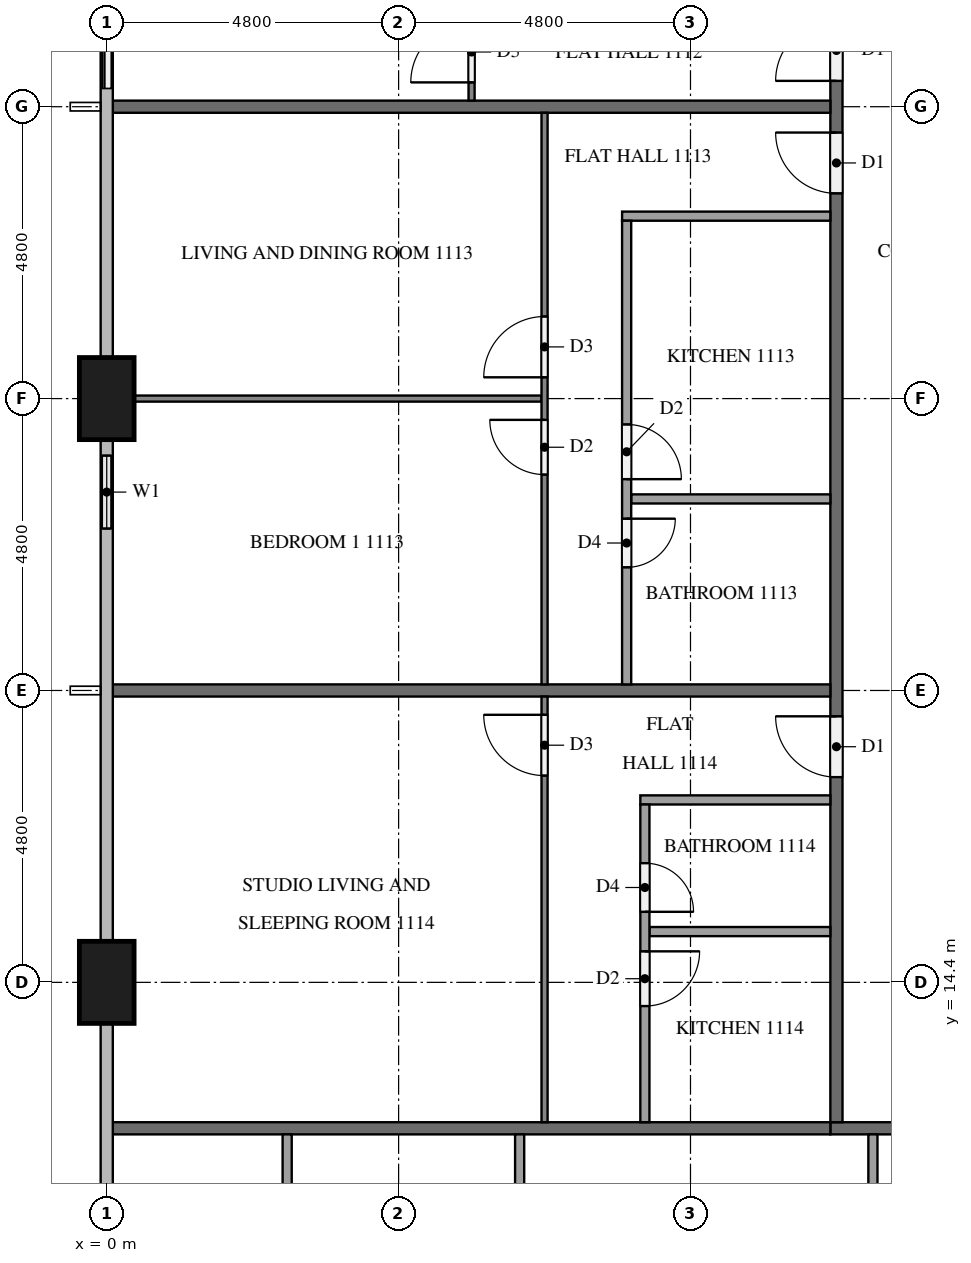
"""IFC4 building model, lengths in metres.
Left out: names, types, materials, properties, quantities, classifications, styles, units other than length and angle.
Written with IfcOpenShell. Run it as: python <this file> out.ifc"""

import sys

from ifc_helpers import new_model, si_unit, direction, frame, frame_2d, origin, origin_2d, place, context, subcontext, project, spatial, rectangle, extrude, element, fill, save


model = new_model("IFC4")
c1 = context("Model", 3, precision=1e-05, world=origin(), true_north=direction((0.0, 1.0)))
c2 = subcontext(c1, "Body", "Model", "MODEL_VIEW")
j1 = project(units=[si_unit("LENGTHUNIT", "METRE"), si_unit("PLANEANGLEUNIT", "RADIAN")], contexts=[c1])
p1 = place(None, origin())
s1 = spatial("IfcSite", under=j1, at=p1, CompositionType="ELEMENT")
p2 = place(p1, origin())
s2 = spatial("IfcBuilding", under=s1, at=p2, CompositionType="ELEMENT")
p3 = place(p2, frame((0.0, 0.0, 46.9)))
s3 = spatial("IfcBuildingStorey", under=s2, at=p3, CompositionType="ELEMENT", Elevation=46.9)
for number, where, z_axis, x_axis in (
    (1, (0.0, 24.0, 0.0), (0.0, 0.0, 1.0), (0.0, 1.0, 0.0)),
    (2, (0.0, 14.4, 0.0), (0.0, 0.0, 1.0), (0.0, 1.0, 0.0)),
):
    element("IfcColumn", number, at=place(p3, frame(where, z_axis=z_axis, x_axis=x_axis)), inside=s3, PredefinedType="COLUMN", context=c2, shape_type="SweptSolid", body=[
        extrude(rectangle(XDim=1.35, YDim=0.9, at=origin_2d()), origin(), (0.0, 0.0, 1.0), 3.2),
    ])
p4 = place(p3, frame((0.0, 31.2, 0.0), z_axis=(0.0, 0.0, 1.0), x_axis=(0.0, -1.0, 0.0)))
e3 = element("IfcWall", 3, at=p4, inside=s3, PredefinedType="SOLIDWALL", context=c2, shape_type="SweptSolid", body=[
    extrude(rectangle(XDim=2.4, YDim=0.15, at=frame_2d((1.2, 0.0))), origin(), (0.0, 0.0, 1.0), 3.2),
])
p5 = place(p4, frame((0.3, 0.0, 0.0)))
e4 = element("IfcOpeningElement", 4, at=p5, cuts=e3, PredefinedType="OPENING", context=c2, shape_type="SweptSolid", body=[
    extrude(rectangle(XDim=1.8, YDim=2.4, at=frame_2d((0.9, 1.2))), frame((0.0, 0.085, 0.0), z_axis=(0.0, -1.0, 0.0), x_axis=(1.0, 0.0, 0.0)), (0.0, 0.0, 1.0), 0.17),
])
p6 = place(p3, frame((0.0, 23.325, 0.0), z_axis=(0.0, 0.0, 1.0), x_axis=(0.0, -1.0, 0.0)))
e5 = element("IfcWall", 5, at=p6, inside=s3, PredefinedType="SOLIDWALL", context=c2, shape_type="SweptSolid", body=[
    extrude(rectangle(XDim=1.725, YDim=0.15, at=frame_2d((0.862, 0.0))), origin(), (0.0, 0.0, 1.0), 3.2),
])
p7 = place(p6, frame((0.262, 0.0, 0.9)))
e6 = element("IfcOpeningElement", 6, at=p7, cuts=e5, PredefinedType="OPENING", context=c2, shape_type="SweptSolid", body=[
    extrude(rectangle(XDim=1.2, YDim=1.4, at=frame_2d((0.6, 0.7))), frame((0.0, 0.085, 0.0), z_axis=(0.0, -1.0, 0.0), x_axis=(1.0, 0.0, 0.0)), (0.0, 0.0, 1.0), 0.17),
])
p8 = place(p3, frame((50.5, 12.0, 0.0), z_axis=(0.0, 0.0, 1.0), x_axis=(-1.0, 0.0, 0.0)))
e7 = element("IfcWall", 7, at=p8, inside=s3, PredefinedType="PARTITIONING", context=c2, shape_type="SweptSolid", body=[
    extrude(rectangle(XDim=38.6, YDim=0.2, at=frame_2d((19.3, 0.0))), origin(), (0.0, 0.0, 1.0), 3.2),
])
p9 = place(p8, frame((36.525, 0.0, 0.0)))
e8 = element("IfcOpeningElement", 8, at=p9, cuts=e7, PredefinedType="OPENING", context=c2, shape_type="SweptSolid", body=[
    extrude(rectangle(XDim=1.0, YDim=2.1, at=frame_2d((0.5, 1.05))), frame((0.0, 0.11, 0.0), z_axis=(0.0, -1.0, 0.0), x_axis=(1.0, 0.0, 0.0)), (0.0, 0.0, 1.0), 0.22),
])
p10 = place(p8, frame((24.525, 0.0, 0.0)))
e9 = element("IfcOpeningElement", 9, at=p10, cuts=e7, PredefinedType="OPENING", context=c2, shape_type="SweptSolid", body=[
    extrude(rectangle(XDim=1.0, YDim=2.1, at=frame_2d((0.5, 1.05))), frame((0.0, 0.11, 0.0), z_axis=(0.0, -1.0, 0.0), x_axis=(1.0, 0.0, 0.0)), (0.0, 0.0, 1.0), 0.22),
])
p11 = place(p8, frame((22.675, 0.0, 0.0)))
e10 = element("IfcOpeningElement", 10, at=p11, cuts=e7, PredefinedType="OPENING", context=c2, shape_type="SweptSolid", body=[
    extrude(rectangle(XDim=1.0, YDim=2.1, at=frame_2d((0.5, 1.05))), frame((0.0, 0.11, 0.0), z_axis=(0.0, -1.0, 0.0), x_axis=(1.0, 0.0, 0.0)), (0.0, 0.0, 1.0), 0.22),
])
p12 = place(p8, frame((8.275, 0.0, 0.0)))
e11 = element("IfcOpeningElement", 11, at=p12, cuts=e7, PredefinedType="OPENING", context=c2, shape_type="SweptSolid", body=[
    extrude(rectangle(XDim=1.0, YDim=2.1, at=frame_2d((0.5, 1.05))), frame((0.0, 0.11, 0.0), z_axis=(0.0, -1.0, 0.0), x_axis=(1.0, 0.0, 0.0)), (0.0, 0.0, 1.0), 0.22),
])
p13 = place(p3, frame((12.0, 12.1, 0.0), z_axis=(0.0, 0.0, 1.0), x_axis=(0.0, 1.0, 0.0)))
e12 = element("IfcWall", 12, at=p13, inside=s3, PredefinedType="PARTITIONING", context=c2, shape_type="SweptSolid", body=[
    extrude(rectangle(XDim=28.6, YDim=0.2, at=frame_2d((14.3, 0.0))), origin(), (0.0, 0.0, 1.0), 3.2),
])
p14 = place(p13, frame((26.725, 0.0, 0.0)))
e13 = element("IfcOpeningElement", 13, at=p14, cuts=e12, PredefinedType="OPENING", context=c2, shape_type="SweptSolid", body=[
    extrude(rectangle(XDim=1.0, YDim=2.1, at=frame_2d((0.5, 1.05))), frame((0.0, 0.11, 0.0), z_axis=(0.0, -1.0, 0.0), x_axis=(1.0, 0.0, 0.0)), (0.0, 0.0, 1.0), 0.22),
])
p15 = place(p13, frame((17.125, 0.0, 0.0)))
e14 = element("IfcOpeningElement", 14, at=p15, cuts=e12, PredefinedType="OPENING", context=c2, shape_type="SweptSolid", body=[
    extrude(rectangle(XDim=1.0, YDim=2.1, at=frame_2d((0.5, 1.05))), frame((0.0, 0.11, 0.0), z_axis=(0.0, -1.0, 0.0), x_axis=(1.0, 0.0, 0.0)), (0.0, 0.0, 1.0), 0.22),
])
p16 = place(p13, frame((15.275, 0.0, 0.0)))
e15 = element("IfcOpeningElement", 15, at=p16, cuts=e12, PredefinedType="OPENING", context=c2, shape_type="SweptSolid", body=[
    extrude(rectangle(XDim=1.0, YDim=2.1, at=frame_2d((0.5, 1.05))), frame((0.0, 0.11, 0.0), z_axis=(0.0, -1.0, 0.0), x_axis=(1.0, 0.0, 0.0)), (0.0, 0.0, 1.0), 0.22),
])
p17 = place(p13, frame((5.675, 0.0, 0.0)))
e16 = element("IfcOpeningElement", 16, at=p17, cuts=e12, PredefinedType="OPENING", context=c2, shape_type="SweptSolid", body=[
    extrude(rectangle(XDim=1.0, YDim=2.1, at=frame_2d((0.5, 1.05))), frame((0.0, 0.11, 0.0), z_axis=(0.0, -1.0, 0.0), x_axis=(1.0, 0.0, 0.0)), (0.0, 0.0, 1.0), 0.22),
])
for number, where, z_axis, x_axis in (
    (17, (0.1, 12.0, 0.0), (0.0, 0.0, 1.0), (1.0, 0.0, 0.0)),
    (18, (0.1, 28.8, 0.0), (0.0, 0.0, 1.0), (1.0, 0.0, 0.0)),
    (19, (0.1, 19.2, 0.0), (0.0, 0.0, 1.0), (1.0, 0.0, 0.0)),
):
    element("IfcWall", number, at=place(p3, frame(where, z_axis=z_axis, x_axis=x_axis)), inside=s3, PredefinedType="PARTITIONING", context=c2, shape_type="SweptSolid", body=[
        extrude(rectangle(XDim=11.8, YDim=0.2, at=frame_2d((5.9, 0.0))), origin(), (0.0, 0.0, 1.0), 3.2),
    ])
for number, where, z_axis, x_axis in (
    (20, (6.79, 11.9, 0.0), (0.0, 0.0, 1.0), (0.0, -1.0, 0.0)),
    (21, (2.967, 11.9, 0.0), (0.0, 0.0, 1.0), (0.0, -1.0, 0.0)),
):
    element("IfcWall", number, at=place(p3, frame(where, z_axis=z_axis, x_axis=x_axis)), inside=s3, PredefinedType="PARTITIONING", context=c2, shape_type="SweptSolid", body=[
        extrude(rectangle(XDim=3.725, YDim=0.15, at=frame_2d((1.862, 0.0))), origin(), (0.0, 0.0, 1.0), 3.2),
    ])
p18 = place(p3, frame((12.6, 11.9, 0.0), z_axis=(0.0, 0.0, 1.0), x_axis=(0.0, -1.0, 0.0)))
e22 = element("IfcWall", 22, at=p18, inside=s3, PredefinedType="PARTITIONING", context=c2, shape_type="SweptSolid", body=[
    extrude(rectangle(XDim=3.875, YDim=0.15, at=frame_2d((1.938, 0.0))), origin(), (0.0, 0.0, 1.0), 3.2),
])
p19 = place(p3, frame((6.0, 28.9, 0.0), z_axis=(0.0, 0.0, 1.0), x_axis=(0.0, 1.0, 0.0)))
e23 = element("IfcWall", 23, at=p19, inside=s3, PredefinedType="PARTITIONING", context=c2, shape_type="SweptSolid", body=[
    extrude(rectangle(XDim=9.4, YDim=0.1, at=frame_2d((4.7, 0.0))), origin(), (0.0, 0.0, 1.0), 3.2),
])
p20 = place(p19, frame((0.3, 0.0, 0.0)))
e24 = element("IfcOpeningElement", 24, at=p20, cuts=e23, PredefinedType="OPENING", context=c2, shape_type="SweptSolid", body=[
    extrude(rectangle(XDim=1.0, YDim=2.1, at=frame_2d((0.5, 1.05))), frame((0.0, 0.06, 0.0), z_axis=(0.0, -1.0, 0.0), x_axis=(1.0, 0.0, 0.0)), (0.0, 0.0, 1.0), 0.12),
])
p21 = place(p19, frame((8.2, 0.0, 0.0)))
e25 = element("IfcOpeningElement", 25, at=p21, cuts=e23, PredefinedType="OPENING", context=c2, shape_type="SweptSolid", body=[
    extrude(rectangle(XDim=0.9, YDim=2.1, at=frame_2d((0.45, 1.05))), frame((0.0, 0.06, 0.0), z_axis=(0.0, -1.0, 0.0), x_axis=(1.0, 0.0, 0.0)), (0.0, 0.0, 1.0), 0.12),
])
p22 = place(p3, frame((7.15, 24.0, 0.0), z_axis=(0.0, 0.0, 1.0), x_axis=(-1.0, 0.0, 0.0)))
e26 = element("IfcWall", 26, at=p22, inside=s3, PredefinedType="PARTITIONING", context=c2, shape_type="SweptSolid", body=[
    extrude(rectangle(XDim=6.7, YDim=0.1, at=frame_2d((3.35, 0.0))), origin(), (0.0, 0.0, 1.0), 3.2),
])
p23 = place(p3, frame((7.2, 19.3, 0.0), z_axis=(0.0, 0.0, 1.0), x_axis=(0.0, 1.0, 0.0)))
e27 = element("IfcWall", 27, at=p23, inside=s3, PredefinedType="PARTITIONING", context=c2, shape_type="SweptSolid", body=[
    extrude(rectangle(XDim=9.4, YDim=0.1, at=frame_2d((4.7, 0.0))), origin(), (0.0, 0.0, 1.0), 3.2),
])
p24 = place(p23, frame((5.05, 0.0, 0.0)))
e28 = element("IfcOpeningElement", 28, at=p24, cuts=e27, PredefinedType="OPENING", context=c2, shape_type="SweptSolid", body=[
    extrude(rectangle(XDim=1.0, YDim=2.1, at=frame_2d((0.5, 1.05))), frame((0.0, 0.06, 0.0), z_axis=(0.0, -1.0, 0.0), x_axis=(1.0, 0.0, 0.0)), (0.0, 0.0, 1.0), 0.12),
])
p25 = place(p23, frame((3.45, 0.0, 0.0)))
e29 = element("IfcOpeningElement", 29, at=p25, cuts=e27, PredefinedType="OPENING", context=c2, shape_type="SweptSolid", body=[
    extrude(rectangle(XDim=0.9, YDim=2.1, at=frame_2d((0.45, 1.05))), frame((0.0, 0.06, 0.0), z_axis=(0.0, -1.0, 0.0), x_axis=(1.0, 0.0, 0.0)), (0.0, 0.0, 1.0), 0.12),
])
p26 = place(p3, frame((11.9, 22.35, 0.0), z_axis=(0.0, 0.0, 1.0), x_axis=(-1.0, 0.0, 0.0)))
e30 = element("IfcWall", 30, at=p26, inside=s3, PredefinedType="PARTITIONING", context=c2, shape_type="SweptSolid", body=[
    extrude(rectangle(XDim=3.275, YDim=0.15, at=frame_2d((1.637, 0.0))), origin(), (0.0, 0.0, 1.0), 3.2),
])
p27 = place(p3, frame((11.9, 27.0, 0.0), z_axis=(0.0, 0.0, 1.0), x_axis=(-1.0, 0.0, 0.0)))
e31 = element("IfcWall", 31, at=p27, inside=s3, PredefinedType="PARTITIONING", context=c2, shape_type="SweptSolid", body=[
    extrude(rectangle(XDim=3.425, YDim=0.15, at=frame_2d((1.712, 0.0))), origin(), (0.0, 0.0, 1.0), 3.2),
])
p28 = place(p3, frame((8.55, 26.925, 0.0), z_axis=(0.0, 0.0, 1.0), x_axis=(0.0, -1.0, 0.0)))
e32 = element("IfcWall", 32, at=p28, inside=s3, PredefinedType="PARTITIONING", context=c2, shape_type="SweptSolid", body=[
    extrude(rectangle(XDim=7.625, YDim=0.15, at=frame_2d((3.812, 0.0))), origin(), (0.0, 0.0, 1.0), 3.2),
])
p29 = place(p28, frame((3.35, 0.0, 0.0)))
e33 = element("IfcOpeningElement", 33, at=p29, cuts=e32, PredefinedType="OPENING", context=c2, shape_type="SweptSolid", body=[
    extrude(rectangle(XDim=0.9, YDim=2.1, at=frame_2d((0.45, 1.05))), frame((0.0, 0.085, 0.0), z_axis=(0.0, -1.0, 0.0), x_axis=(1.0, 0.0, 0.0)), (0.0, 0.0, 1.0), 0.17),
])
p30 = place(p28, frame((4.9, 0.0, 0.0)))
e34 = element("IfcOpeningElement", 34, at=p30, cuts=e32, PredefinedType="OPENING", context=c2, shape_type="SweptSolid", body=[
    extrude(rectangle(XDim=0.8, YDim=2.1, at=frame_2d((0.4, 1.05))), frame((0.0, 0.085, 0.0), z_axis=(0.0, -1.0, 0.0), x_axis=(1.0, 0.0, 0.0)), (0.0, 0.0, 1.0), 0.17),
])
p31 = place(p3, frame((7.2, 12.1, 0.0), z_axis=(0.0, 0.0, 1.0), x_axis=(0.0, 1.0, 0.0)))
e35 = element("IfcWall", 35, at=p31, inside=s3, PredefinedType="PARTITIONING", context=c2, shape_type="SweptSolid", body=[
    extrude(rectangle(XDim=7.0, YDim=0.1, at=frame_2d((3.5, 0.0))), origin(), (0.0, 0.0, 1.0), 3.2),
])
p32 = place(p31, frame((5.7, 0.0, 0.0)))
e36 = element("IfcOpeningElement", 36, at=p32, cuts=e35, PredefinedType="OPENING", context=c2, shape_type="SweptSolid", body=[
    extrude(rectangle(XDim=1.0, YDim=2.1, at=frame_2d((0.5, 1.05))), frame((0.0, 0.06, 0.0), z_axis=(0.0, -1.0, 0.0), x_axis=(1.0, 0.0, 0.0)), (0.0, 0.0, 1.0), 0.12),
])
p33 = place(p3, frame((11.9, 15.235, 0.0), z_axis=(0.0, 0.0, 1.0), x_axis=(-1.0, 0.0, 0.0)))
e37 = element("IfcWall", 37, at=p33, inside=s3, PredefinedType="PARTITIONING", context=c2, shape_type="SweptSolid", body=[
    extrude(rectangle(XDim=2.975, YDim=0.15, at=frame_2d((1.487, 0.0))), origin(), (0.0, 0.0, 1.0), 3.2),
])
p34 = place(p3, frame((11.9, 17.4, 0.0), z_axis=(0.0, 0.0, 1.0), x_axis=(-1.0, 0.0, 0.0)))
e38 = element("IfcWall", 38, at=p34, inside=s3, PredefinedType="PARTITIONING", context=c2, shape_type="SweptSolid", body=[
    extrude(rectangle(XDim=3.125, YDim=0.15, at=frame_2d((1.562, 0.0))), origin(), (0.0, 0.0, 1.0), 3.2),
])
p35 = place(p3, frame((8.85, 17.325, 0.0), z_axis=(0.0, 0.0, 1.0), x_axis=(0.0, -1.0, 0.0)))
e39 = element("IfcWall", 39, at=p35, inside=s3, PredefinedType="PARTITIONING", context=c2, shape_type="SweptSolid", body=[
    extrude(rectangle(XDim=5.225, YDim=0.15, at=frame_2d((2.612, 0.0))), origin(), (0.0, 0.0, 1.0), 3.2),
])
p36 = place(p35, frame((0.965, 0.0, 0.0)))
e40 = element("IfcOpeningElement", 40, at=p36, cuts=e39, PredefinedType="OPENING", context=c2, shape_type="SweptSolid", body=[
    extrude(rectangle(XDim=0.8, YDim=2.1, at=frame_2d((0.4, 1.05))), frame((0.0, 0.085, 0.0), z_axis=(0.0, -1.0, 0.0), x_axis=(1.0, 0.0, 0.0)), (0.0, 0.0, 1.0), 0.17),
])
p37 = place(p35, frame((2.415, 0.0, 0.0)))
e41 = element("IfcOpeningElement", 41, at=p37, cuts=e39, PredefinedType="OPENING", context=c2, shape_type="SweptSolid", body=[
    extrude(rectangle(XDim=0.9, YDim=2.1, at=frame_2d((0.45, 1.05))), frame((0.0, 0.085, 0.0), z_axis=(0.0, -1.0, 0.0), x_axis=(1.0, 0.0, 0.0)), (0.0, 0.0, 1.0), 0.17),
])
p38 = place(p5, origin())
e42 = element("IfcDoor", 42, at=p38, inside=s3, OperationType="SLIDING_TO_RIGHT", PredefinedType="DOOR", context=c2, shape_type="SweptSolid", body=[
    extrude(rectangle(XDim=1.8, YDim=2.4, at=frame_2d((0.9, 1.2))), frame((0.0, 0.025, 0.0), z_axis=(0.0, -1.0, 0.0), x_axis=(1.0, 0.0, 0.0)), (0.0, 0.0, 1.0), 0.05),
])
fill(e4, e42)
p39 = place(p7, origin())
e43 = element("IfcWindow", 43, at=p39, inside=s3, PartitioningType="SINGLE_PANEL", PredefinedType="WINDOW", context=c2, shape_type="SweptSolid", body=[
    extrude(rectangle(XDim=1.2, YDim=1.4, at=frame_2d((0.6, 0.7))), frame((0.0, 0.03, 0.0), z_axis=(0.0, -1.0, 0.0), x_axis=(1.0, 0.0, 0.0)), (0.0, 0.0, 1.0), 0.06),
])
fill(e6, e43)
p40 = place(p15, origin())
e44 = element("IfcDoor", 44, at=p40, inside=s3, OperationType="SINGLE_SWING_LEFT", PredefinedType="DOOR", context=c2, shape_type="SweptSolid", body=[
    extrude(rectangle(XDim=1.0, YDim=2.1, at=frame_2d((0.5, 1.05))), frame((0.0, 0.025, 0.0), z_axis=(0.0, -1.0, 0.0), x_axis=(1.0, 0.0, 0.0)), (0.0, 0.0, 1.0), 0.05),
])
fill(e14, e44)
p41 = place(p16, origin())
e45 = element("IfcDoor", 45, at=p41, inside=s3, OperationType="SINGLE_SWING_RIGHT", PredefinedType="DOOR", context=c2, shape_type="SweptSolid", body=[
    extrude(rectangle(XDim=1.0, YDim=2.1, at=frame_2d((0.5, 1.05))), frame((0.0, 0.025, 0.0), z_axis=(0.0, -1.0, 0.0), x_axis=(1.0, 0.0, 0.0)), (0.0, 0.0, 1.0), 0.05),
])
fill(e15, e45)
p42 = place(p17, origin())
e46 = element("IfcDoor", 46, at=p42, inside=s3, OperationType="SINGLE_SWING_RIGHT", PredefinedType="DOOR", context=c2, shape_type="SweptSolid", body=[
    extrude(rectangle(XDim=1.0, YDim=2.1, at=frame_2d((0.5, 1.05))), frame((0.0, 0.025, 0.0), z_axis=(0.0, -1.0, 0.0), x_axis=(1.0, 0.0, 0.0)), (0.0, 0.0, 1.0), 0.05),
])
fill(e16, e46)
p43 = place(p20, origin())
e47 = element("IfcDoor", 47, at=p43, inside=s3, OperationType="SINGLE_SWING_LEFT", PredefinedType="DOOR", context=c2, shape_type="SweptSolid", body=[
    extrude(rectangle(XDim=1.0, YDim=2.1, at=frame_2d((0.5, 1.05))), frame((0.0, 0.025, 0.0), z_axis=(0.0, -1.0, 0.0), x_axis=(1.0, 0.0, 0.0)), (0.0, 0.0, 1.0), 0.05),
])
fill(e24, e47)
p44 = place(p24, origin())
e48 = element("IfcDoor", 48, at=p44, inside=s3, OperationType="SINGLE_SWING_LEFT", PredefinedType="DOOR", context=c2, shape_type="SweptSolid", body=[
    extrude(rectangle(XDim=1.0, YDim=2.1, at=frame_2d((0.5, 1.05))), frame((0.0, 0.025, 0.0), z_axis=(0.0, -1.0, 0.0), x_axis=(1.0, 0.0, 0.0)), (0.0, 0.0, 1.0), 0.05),
])
fill(e28, e48)
p45 = place(p25, origin())
e49 = element("IfcDoor", 49, at=p45, inside=s3, OperationType="SINGLE_SWING_RIGHT", PredefinedType="DOOR", context=c2, shape_type="SweptSolid", body=[
    extrude(rectangle(XDim=0.9, YDim=2.1, at=frame_2d((0.45, 1.05))), frame((0.0, 0.025, 0.0), z_axis=(0.0, -1.0, 0.0), x_axis=(1.0, 0.0, 0.0)), (0.0, 0.0, 1.0), 0.05),
])
fill(e29, e49)
p46 = place(p29, origin())
e50 = element("IfcDoor", 50, at=p46, inside=s3, OperationType="SINGLE_SWING_RIGHT", PredefinedType="DOOR", context=c2, shape_type="SweptSolid", body=[
    extrude(rectangle(XDim=0.9, YDim=2.1, at=frame_2d((0.45, 1.05))), frame((0.0, 0.025, 0.0), z_axis=(0.0, -1.0, 0.0), x_axis=(1.0, 0.0, 0.0)), (0.0, 0.0, 1.0), 0.05),
])
fill(e33, e50)
p47 = place(p30, origin())
e51 = element("IfcDoor", 51, at=p47, inside=s3, OperationType="SINGLE_SWING_LEFT", PredefinedType="DOOR", context=c2, shape_type="SweptSolid", body=[
    extrude(rectangle(XDim=0.8, YDim=2.1, at=frame_2d((0.4, 1.05))), frame((0.0, 0.025, 0.0), z_axis=(0.0, -1.0, 0.0), x_axis=(1.0, 0.0, 0.0)), (0.0, 0.0, 1.0), 0.05),
])
fill(e34, e51)
p48 = place(p32, origin())
e52 = element("IfcDoor", 52, at=p48, inside=s3, OperationType="SINGLE_SWING_RIGHT", PredefinedType="DOOR", context=c2, shape_type="SweptSolid", body=[
    extrude(rectangle(XDim=1.0, YDim=2.1, at=frame_2d((0.5, 1.05))), frame((0.0, 0.025, 0.0), z_axis=(0.0, -1.0, 0.0), x_axis=(1.0, 0.0, 0.0)), (0.0, 0.0, 1.0), 0.05),
])
fill(e36, e52)
p49 = place(p36, origin())
e53 = element("IfcDoor", 53, at=p49, inside=s3, OperationType="SINGLE_SWING_RIGHT", PredefinedType="DOOR", context=c2, shape_type="SweptSolid", body=[
    extrude(rectangle(XDim=0.8, YDim=2.1, at=frame_2d((0.4, 1.05))), frame((0.0, 0.025, 0.0), z_axis=(0.0, -1.0, 0.0), x_axis=(1.0, 0.0, 0.0)), (0.0, 0.0, 1.0), 0.05),
])
fill(e40, e53)
p50 = place(p37, origin())
e54 = element("IfcDoor", 54, at=p50, inside=s3, OperationType="SINGLE_SWING_LEFT", PredefinedType="DOOR", context=c2, shape_type="SweptSolid", body=[
    extrude(rectangle(XDim=0.9, YDim=2.1, at=frame_2d((0.45, 1.05))), frame((0.0, 0.025, 0.0), z_axis=(0.0, -1.0, 0.0), x_axis=(1.0, 0.0, 0.0)), (0.0, 0.0, 1.0), 0.05),
])
fill(e41, e54)
save(model, sys.argv[1])
